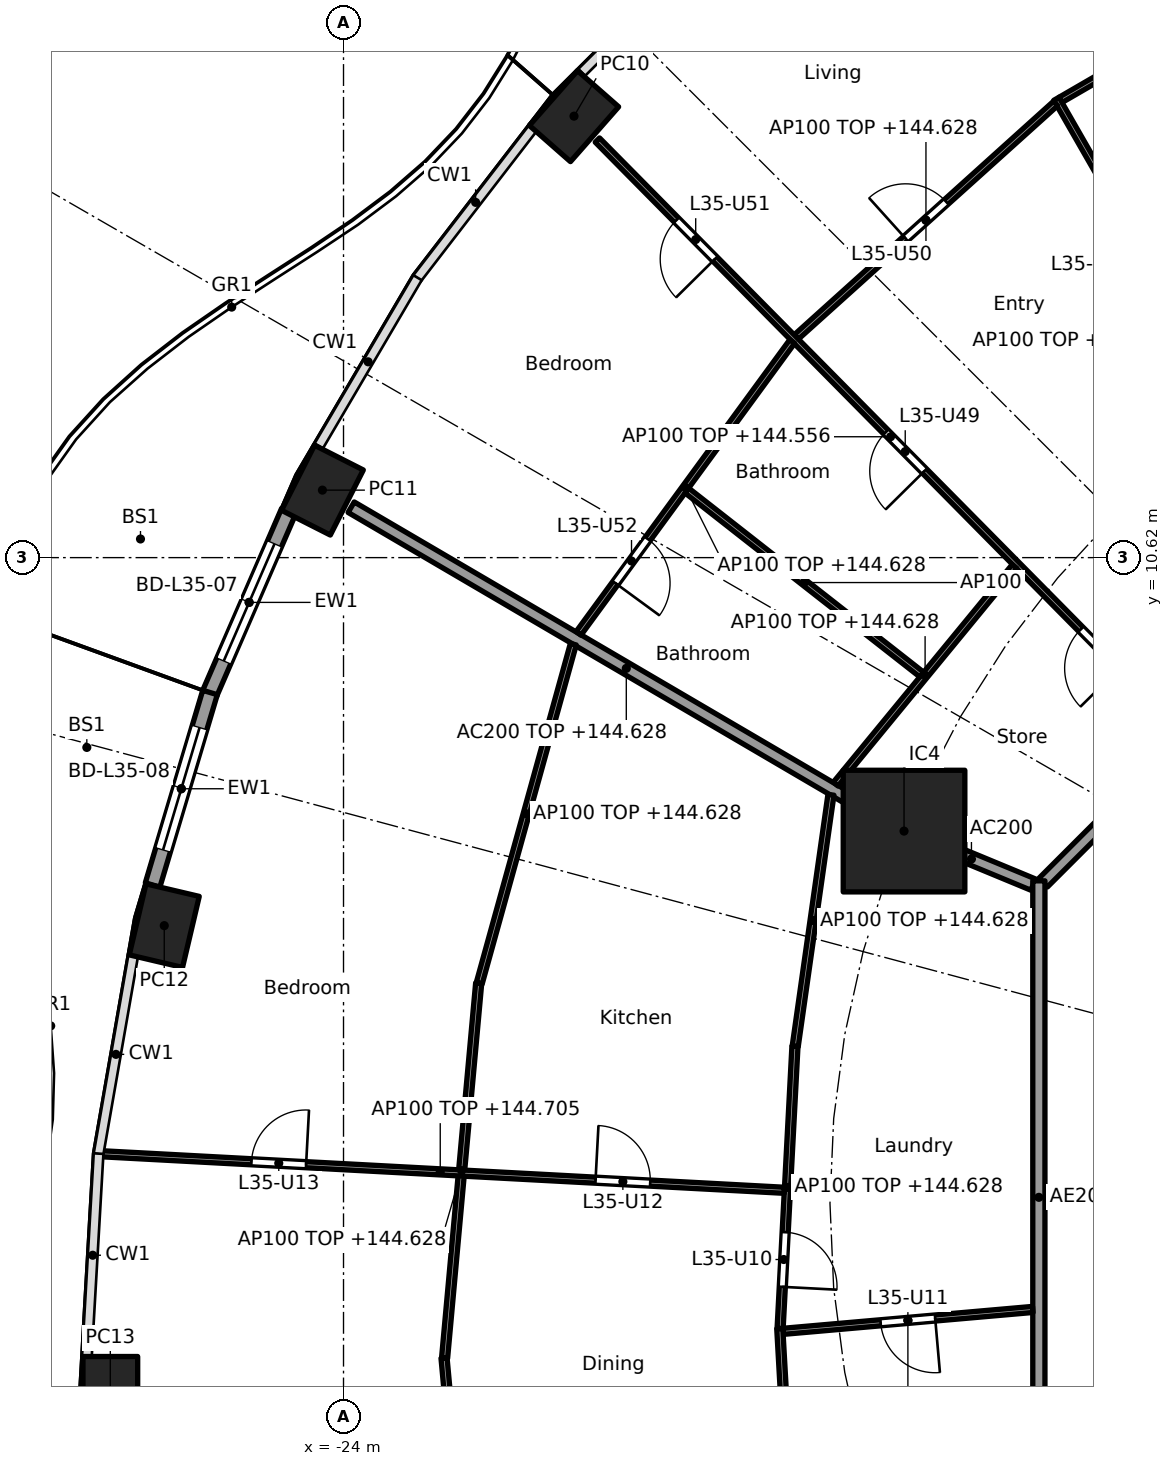
"""IFC4 building model, lengths in metres.
Left out: names, types, materials, properties, quantities, classifications, styles, units other than length and angle.
Written with IfcOpenShell. Run it as: python <this file> out.ifc"""

import sys

from ifc_helpers import new_model, si_unit, direction, frame, frame_2d, origin, origin_2d, place, context, subcontext, project, spatial, rectangle, hollow_rectangle, extrude, element, fill, save


model = new_model("IFC4")
c1 = context("Model", 3, precision=1e-05, world=origin(), true_north=direction((0.0, 1.0)))
c2 = subcontext(c1, "Body", "Model", "MODEL_VIEW")
j1 = project(units=[si_unit("LENGTHUNIT", "METRE"), si_unit("PLANEANGLEUNIT", "RADIAN")], contexts=[c1])
p1 = place(None, origin())
s1 = spatial("IfcSite", under=j1, at=p1, CompositionType="ELEMENT")
p2 = place(p1, origin())
s2 = spatial("IfcBuilding", under=s1, at=p2, CompositionType="ELEMENT")
p3 = place(p2, frame((0.0, 0.0, 141.8)))
s3 = spatial("IfcBuildingStorey", under=s2, at=p3, CompositionType="ELEMENT", Elevation=141.8)
for number, where, z_axis, x_axis in (
    (1, (-20.209, 17.88, 0.0), (0.0, 0.0, 1.0), (-0.66, -0.751, 0.0)),
    (2, (-24.347, 11.73, 0.0), (0.0, 0.0, 1.0), (-0.452, -0.892, 0.0)),
    (3, (-26.948, 4.568, 0.0), (0.0, 0.0, 1.0), (-0.229, -0.973, 0.0)),
    (4, (-27.835, -3.118, 0.0), (0.0, 0.0, 1.0), (0.0, -1.0, 0.0)),
):
    element("IfcColumn", number, at=place(p3, frame(where, z_axis=z_axis, x_axis=x_axis)), inside=s3, PredefinedType="COLUMN", context=c2, shape_type="SweptSolid", body=[
        extrude(hollow_rectangle(XDim=1.2, YDim=0.9, WallThickness=0.04, at=origin_2d()), origin(), (0.0, 0.0, 1.0), 3.7),
    ])
p4 = place(p3, frame((-14.782, 6.123, 0.0), z_axis=(0.0, 0.0, 1.0), x_axis=(1.0, 0.0, 0.0)))
e5 = element("IfcColumn", 5, at=p4, inside=s3, PredefinedType="COLUMN", context=c2, shape_type="SweptSolid", body=[
    extrude(rectangle(XDim=2.0, YDim=2.0, at=origin_2d()), origin(), (0.0, 0.0, 1.0), 3.7),
])
p5 = place(p3, frame((-26.2, 8.388, 0.0), z_axis=(0.0, 0.0, 1.0), x_axis=(0.397638954585, 0.917541967321, 0.0)))
e6 = element("IfcWall", 6, at=p5, inside=s3, PredefinedType="SOLIDWALL", context=c2, shape_type="SweptSolid", body=[
    extrude(rectangle(XDim=3.261, YDim=0.25, at=frame_2d((1.63, 0.0))), origin(), (0.0, 0.0, 1.0), 3.44),
])
p6 = place(p5, frame((0.58, 0.0, 0.0)))
e7 = element("IfcOpeningElement", 7, at=p6, cuts=e6, PredefinedType="OPENING", context=c2, shape_type="SweptSolid", body=[
    extrude(rectangle(XDim=2.1, YDim=2.4, at=frame_2d((1.05, 1.2))), frame((0.0, 0.135, 0.0), z_axis=(0.0, -1.0, 0.0), x_axis=(1.0, 0.0, 0.0)), (0.0, 0.0, 1.0), 0.27),
])
p7 = place(p3, frame((-27.14, 5.237, 0.0), z_axis=(0.0, 0.0, 1.0), x_axis=(0.285909915381, 0.958256500258, 0.0)))
e8 = element("IfcWall", 8, at=p7, inside=s3, PredefinedType="SOLIDWALL", context=c2, shape_type="SweptSolid", body=[
    extrude(rectangle(XDim=3.303, YDim=0.25, at=frame_2d((1.651, 0.0))), origin(), (0.0, 0.0, 1.0), 3.44),
])
p8 = place(p7, frame((0.602, 0.0, 0.0)))
e9 = element("IfcOpeningElement", 9, at=p8, cuts=e8, PredefinedType="OPENING", context=c2, shape_type="SweptSolid", body=[
    extrude(rectangle(XDim=2.1, YDim=2.4, at=frame_2d((1.05, 1.2))), frame((0.0, 0.135, 0.0), z_axis=(0.0, -1.0, 0.0), x_axis=(1.0, 0.0, 0.0)), (0.0, 0.0, 1.0), 0.27),
])
p9 = place(p3, frame((-12.657, 5.243, 0.0), z_axis=(0.0, 0.0, 1.0), x_axis=(-0.923869415315, 0.382707856524, 0.0)))
e10 = element("IfcWall", 10, at=p9, inside=s3, PredefinedType="PARTITIONING", context=c2, shape_type="SweptSolid", body=[
    extrude(rectangle(XDim=2.2, YDim=0.2, at=frame_2d((1.1, 0.0))), origin(), (0.0, 0.0, 1.0), 3.44),
])
p10 = place(p3, frame((-14.825, 6.148, 0.0), z_axis=(0.0, 0.0, 1.0), x_axis=(-0.862852031662, 0.505456597006, 0.0)))
e11 = element("IfcWall", 11, at=p10, inside=s3, PredefinedType="PARTITIONING", context=c2, shape_type="SweptSolid", body=[
    extrude(rectangle(XDim=10.487, YDim=0.2, at=frame_2d((5.244, 0.0))), origin(), (0.0, 0.0, 1.0), 2.828),
])
p11 = place(p3, frame((-5.275, 12.494, 0.0), z_axis=(0.0, 0.0, 1.0), x_axis=(-0.707106781187, -0.707106781187, 0.0)))
e12 = element("IfcWall", 12, at=p11, inside=s3, PredefinedType="PARTITIONING", context=c2, shape_type="SweptSolid", body=[
    extrude(rectangle(XDim=10.209, YDim=0.2, at=frame_2d((5.104, 0.0))), origin(), (0.0, 0.0, 1.0), 3.44),
])
p12 = place(p11, frame((4.604, 0.0, 0.0)))
e13 = element("IfcOpeningElement", 13, at=p12, cuts=e12, PredefinedType="OPENING", context=c2, shape_type="SweptSolid", body=[
    extrude(rectangle(XDim=1.0, YDim=2.1, at=frame_2d((0.5, 1.05))), frame((0.0, 0.11, 0.0), z_axis=(0.0, -1.0, 0.0), x_axis=(1.0, 0.0, 0.0)), (0.0, 0.0, 1.0), 0.22),
])
p13 = place(p3, frame((-12.565, 5.304, 0.0), z_axis=(0.0, 0.0, 1.0), x_axis=(0.0, -1.0, 0.0)))
e14 = element("IfcWall", 14, at=p13, inside=s3, PredefinedType="PARTITIONING", context=c2, shape_type="SweptSolid", body=[
    extrude(rectangle(XDim=10.409, YDim=0.2, at=frame_2d((5.205, 0.0))), origin(), (0.0, 0.0, 1.0), 3.44),
])
p14 = place(p3, frame((-7.586, 20.827, 0.0), z_axis=(0.0, 0.0, 1.0), x_axis=(-0.865093450578, -0.501610727325, 0.0)))
e15 = element("IfcWall", 15, at=p14, inside=s3, PredefinedType="PARTITIONING", context=c2, shape_type="SweptSolid", body=[
    extrude(rectangle(XDim=5.343, YDim=0.1, at=frame_2d((2.671, 0.0))), origin(), (0.0, 0.0, 1.0), 2.828),
])
p15 = place(p3, frame((-7.708, 10.198, 0.0), z_axis=(0.0, 0.0, 1.0), x_axis=(-0.497449462689, 0.867492957937, 0.0)))
e16 = element("IfcWall", 16, at=p15, inside=s3, PredefinedType="PARTITIONING", context=c2, shape_type="SweptSolid", body=[
    extrude(rectangle(XDim=9.185, YDim=0.1, at=frame_2d((4.592, 0.0))), origin(), (0.0, 0.0, 1.0), 2.756),
])
p16 = place(p15, frame((1.511, 0.0, 0.0)))
e17 = element("IfcOpeningElement", 17, at=p16, cuts=e16, PredefinedType="OPENING", context=c2, shape_type="SweptSolid", body=[
    extrude(rectangle(XDim=0.9, YDim=2.1, at=frame_2d((0.45, 1.05))), frame((0.0, 0.06, 0.0), z_axis=(0.0, -1.0, 0.0), x_axis=(1.0, 0.0, 0.0)), (0.0, 0.0, 1.0), 0.12),
])
p17 = place(p15, frame((6.078, 0.0, 0.0)))
e18 = element("IfcOpeningElement", 18, at=p17, cuts=e16, PredefinedType="OPENING", context=c2, shape_type="SweptSolid", body=[
    extrude(rectangle(XDim=0.9, YDim=2.1, at=frame_2d((0.45, 1.05))), frame((0.0, 0.06, 0.0), z_axis=(0.0, -1.0, 0.0), x_axis=(1.0, 0.0, 0.0)), (0.0, 0.0, 1.0), 0.12),
])
p18 = place(p3, frame((-12.289, 18.089, 0.0), z_axis=(0.0, 0.0, 1.0), x_axis=(-0.743146066164, -0.669129228435, 0.0)))
e19 = element("IfcWall", 19, at=p18, inside=s3, PredefinedType="PARTITIONING", context=c2, shape_type="SweptSolid", body=[
    extrude(rectangle(XDim=5.739, YDim=0.1, at=frame_2d((2.87, 0.0))), origin(), (0.0, 0.0, 1.0), 2.828),
])
p19 = place(p18, frame((2.42, 0.0, 0.0)))
e20 = element("IfcOpeningElement", 20, at=p19, cuts=e19, PredefinedType="OPENING", context=c2, shape_type="SweptSolid", body=[
    extrude(rectangle(XDim=0.9, YDim=2.1, at=frame_2d((0.45, 1.05))), frame((0.0, 0.06, 0.0), z_axis=(0.0, -1.0, 0.0), x_axis=(1.0, 0.0, 0.0)), (0.0, 0.0, 1.0), 0.12),
])
p20 = place(p3, frame((-10.182, 7.729, 0.0), z_axis=(0.0, 0.0, 1.0), x_axis=(-0.702930219229, 0.7112588185, 0.0)))
e21 = element("IfcWall", 21, at=p20, inside=s3, PredefinedType="PARTITIONING", context=c2, shape_type="SweptSolid", body=[
    extrude(rectangle(XDim=13.719, YDim=0.1, at=frame_2d((6.859, 0.0))), origin(), (0.0, 0.0, 1.0), 2.756),
])
p21 = place(p20, frame((1.507, 0.0, 0.0)))
e22 = element("IfcOpeningElement", 22, at=p21, cuts=e21, PredefinedType="OPENING", context=c2, shape_type="SweptSolid", body=[
    extrude(rectangle(XDim=0.9, YDim=2.1, at=frame_2d((0.45, 1.05))), frame((0.0, 0.06, 0.0), z_axis=(0.0, -1.0, 0.0), x_axis=(1.0, 0.0, 0.0)), (0.0, 0.0, 1.0), 0.12),
])
p22 = place(p20, frame((6.067, 0.0, 0.0)))
e23 = element("IfcOpeningElement", 23, at=p22, cuts=e21, PredefinedType="OPENING", context=c2, shape_type="SweptSolid", body=[
    extrude(rectangle(XDim=0.9, YDim=2.1, at=frame_2d((0.45, 1.05))), frame((0.0, 0.06, 0.0), z_axis=(0.0, -1.0, 0.0), x_axis=(1.0, 0.0, 0.0)), (0.0, 0.0, 1.0), 0.12),
])
p23 = place(p20, frame((10.969, 0.0, 0.0)))
e24 = element("IfcOpeningElement", 24, at=p23, cuts=e21, PredefinedType="OPENING", context=c2, shape_type="SweptSolid", body=[
    extrude(rectangle(XDim=0.9, YDim=2.1, at=frame_2d((0.45, 1.05))), frame((0.0, 0.06, 0.0), z_axis=(0.0, -1.0, 0.0), x_axis=(1.0, 0.0, 0.0)), (0.0, 0.0, 1.0), 0.12),
])
p24 = place(p3, frame((-12.965, 10.475, 0.0), z_axis=(0.0, 0.0, 1.0), x_axis=(-0.634943961338, -0.772558195841, 0.0)))
e25 = element("IfcWall", 25, at=p24, inside=s3, PredefinedType="PARTITIONING", context=c2, shape_type="SweptSolid", body=[
    extrude(rectangle(XDim=4.632, YDim=0.1, at=frame_2d((2.316, 0.0))), origin(), (0.0, 0.0, 1.0), 2.828),
])
p25 = place(p3, frame((-16.621, 14.174, 0.0), z_axis=(0.0, 0.0, 1.0), x_axis=(-0.590674917338, -0.806909624449, 0.0)))
e26 = element("IfcWall", 26, at=p25, inside=s3, PredefinedType="PARTITIONING", context=c2, shape_type="SweptSolid", body=[
    extrude(rectangle(XDim=5.949, YDim=0.1, at=frame_2d((2.975, 0.0))), origin(), (0.0, 0.0, 1.0), 2.828),
])
p26 = place(p25, frame((4.024, 0.0, 0.0)))
e27 = element("IfcOpeningElement", 27, at=p26, cuts=e26, PredefinedType="OPENING", context=c2, shape_type="SweptSolid", body=[
    extrude(rectangle(XDim=0.9, YDim=2.1, at=frame_2d((0.45, 1.05))), frame((0.0, 0.06, 0.0), z_axis=(0.0, -1.0, 0.0), x_axis=(1.0, 0.0, 0.0)), (0.0, 0.0, 1.0), 0.12),
])
p27 = place(p3, frame((-14.491, 8.697, 0.0), z_axis=(0.0, 0.0, 1.0), x_axis=(-0.787139479951, 0.616775031193, 0.0)))
e28 = element("IfcWall", 28, at=p27, inside=s3, PredefinedType="PARTITIONING", context=c2, shape_type="SweptSolid", body=[
    extrude(rectangle(XDim=4.907, YDim=0.1, at=frame_2d((2.453, 0.0))), origin(), (0.0, 0.0, 1.0), 3.44),
])
p28 = place(p3, frame((-15.984, 6.72, 0.0), z_axis=(0.0, 0.0, 1.0), x_axis=(-0.140684869512, -0.990054426529, 0.0)))
e29 = element("IfcWall", 29, at=p28, inside=s3, PredefinedType="PARTITIONING", context=c2, shape_type="SweptSolid", body=[
    extrude(rectangle(XDim=4.177, YDim=0.1, at=frame_2d((2.088, 0.0))), origin(), (0.0, 0.0, 1.0), 2.828),
])
p29 = place(p3, frame((-20.221, 9.197, 0.0), z_axis=(0.0, 0.0, 1.0), x_axis=(-0.267398009191, -0.963586168789, 0.0)))
e30 = element("IfcWall", 30, at=p29, inside=s3, PredefinedType="PARTITIONING", context=c2, shape_type="SweptSolid", body=[
    extrude(rectangle(XDim=5.788, YDim=0.1, at=frame_2d((2.894, 0.0))), origin(), (0.0, 0.0, 1.0), 2.828),
])
p30 = place(p3, frame((-16.576, 2.585, 0.0), z_axis=(0.0, 0.0, 1.0), x_axis=(-0.052509224895, -0.998620439056, 0.0)))
e31 = element("IfcWall", 31, at=p30, inside=s3, PredefinedType="PARTITIONING", context=c2, shape_type="SweptSolid", body=[
    extrude(rectangle(XDim=4.649, YDim=0.1, at=frame_2d((2.325, 0.0))), origin(), (0.0, 0.0, 1.0), 2.828),
])
p31 = place(p30, frame((3.062, 0.0, 0.0)))
e32 = element("IfcOpeningElement", 32, at=p31, cuts=e31, PredefinedType="OPENING", context=c2, shape_type="SweptSolid", body=[
    extrude(rectangle(XDim=0.9, YDim=2.1, at=frame_2d((0.45, 1.05))), frame((0.0, 0.06, 0.0), z_axis=(0.0, -1.0, 0.0), x_axis=(1.0, 0.0, 0.0)), (0.0, 0.0, 1.0), 0.12),
])
p32 = place(p3, frame((-21.777, 3.621, 0.0), z_axis=(0.0, 0.0, 1.0), x_axis=(-0.090606877484, -0.995886737412, 0.0)))
e33 = element("IfcWall", 33, at=p32, inside=s3, PredefinedType="PARTITIONING", context=c2, shape_type="SweptSolid", body=[
    extrude(rectangle(XDim=6.189, YDim=0.1, at=frame_2d((3.095, 0.0))), origin(), (0.0, 0.0, 1.0), 2.828),
])
p33 = place(p3, frame((-16.75, 0.216, 0.0), z_axis=(0.0, 0.0, 1.0), x_axis=(-0.998572054207, 0.053421461579, 0.0)))
e34 = element("IfcWall", 34, at=p33, inside=s3, PredefinedType="PARTITIONING", context=c2, shape_type="SweptSolid", body=[
    extrude(rectangle(XDim=11.334, YDim=0.1, at=frame_2d((5.667, 0.0))), origin(), (0.0, 0.0, 1.0), 2.905),
])
p34 = place(p33, frame((2.209, 0.0, 0.0)))
e35 = element("IfcOpeningElement", 35, at=p34, cuts=e34, PredefinedType="OPENING", context=c2, shape_type="SweptSolid", body=[
    extrude(rectangle(XDim=0.9, YDim=2.1, at=frame_2d((0.45, 1.05))), frame((0.0, 0.06, 0.0), z_axis=(0.0, -1.0, 0.0), x_axis=(1.0, 0.0, 0.0)), (0.0, 0.0, 1.0), 0.12),
])
p35 = place(p33, frame((7.876, 0.0, 0.0)))
e36 = element("IfcOpeningElement", 36, at=p35, cuts=e34, PredefinedType="OPENING", context=c2, shape_type="SweptSolid", body=[
    extrude(rectangle(XDim=0.9, YDim=2.1, at=frame_2d((0.45, 1.05))), frame((0.0, 0.06, 0.0), z_axis=(0.0, -1.0, 0.0), x_axis=(1.0, 0.0, 0.0)), (0.0, 0.0, 1.0), 0.12),
])
p36 = place(p3, frame((-12.664, -1.744, 0.0), z_axis=(0.0, 0.0, 1.0), x_axis=(-0.996181049379, -0.08731160781, 0.0)))
e37 = element("IfcWall", 37, at=p36, inside=s3, PredefinedType="PARTITIONING", context=c2, shape_type="SweptSolid", body=[
    extrude(rectangle(XDim=4.125, YDim=0.1, at=frame_2d((2.062, 0.0))), origin(), (0.0, 0.0, 1.0), 2.756),
])
p37 = place(p36, frame((1.612, 0.0, 0.0)))
e38 = element("IfcOpeningElement", 38, at=p37, cuts=e37, PredefinedType="OPENING", context=c2, shape_type="SweptSolid", body=[
    extrude(rectangle(XDim=0.9, YDim=2.1, at=frame_2d((0.45, 1.05))), frame((0.0, 0.06, 0.0), z_axis=(0.0, -1.0, 0.0), x_axis=(1.0, 0.0, 0.0)), (0.0, 0.0, 1.0), 0.12),
])
p38 = place(p3, frame((-16.825, -2.058, 0.0), z_axis=(0.0, 0.0, 1.0), x_axis=(0.055971643802, -0.998432358796, 0.0)))
e39 = element("IfcWall", 39, at=p38, inside=s3, PredefinedType="PARTITIONING", context=c2, shape_type="SweptSolid", body=[
    extrude(rectangle(XDim=4.798, YDim=0.1, at=frame_2d((2.399, 0.0))), origin(), (0.0, 0.0, 1.0), 2.828),
])
p39 = place(p3, frame((-22.347, -2.542, 0.0), z_axis=(0.0, 0.0, 1.0), x_axis=(0.091783634244, -0.995778973711, 0.0)))
e40 = element("IfcWall", 40, at=p39, inside=s3, PredefinedType="PARTITIONING", context=c2, shape_type="SweptSolid", body=[
    extrude(rectangle(XDim=6.315, YDim=0.1, at=frame_2d((3.157, 0.0))), origin(), (0.0, 0.0, 1.0), 2.828),
])
p40 = place(p39, frame((2.708, 0.0, 0.0)))
e41 = element("IfcOpeningElement", 41, at=p40, cuts=e40, PredefinedType="OPENING", context=c2, shape_type="SweptSolid", body=[
    extrude(rectangle(XDim=0.9, YDim=2.1, at=frame_2d((0.45, 1.05))), frame((0.0, 0.06, 0.0), z_axis=(0.0, -1.0, 0.0), x_axis=(1.0, 0.0, 0.0)), (0.0, 0.0, 1.0), 0.12),
])
p41 = place(p6, origin())
e42 = element("IfcDoor", 42, at=p41, inside=s3, OperationType="SLIDING_TO_LEFT", PredefinedType="DOOR", context=c2, shape_type="SweptSolid", body=[
    extrude(rectangle(XDim=2.1, YDim=2.4, at=frame_2d((1.05, 1.2))), frame((0.0, 0.025, 0.0), z_axis=(0.0, -1.0, 0.0), x_axis=(1.0, 0.0, 0.0)), (0.0, 0.0, 1.0), 0.05),
])
fill(e7, e42)
p42 = place(p8, origin())
e43 = element("IfcDoor", 43, at=p42, inside=s3, OperationType="SLIDING_TO_LEFT", PredefinedType="DOOR", context=c2, shape_type="SweptSolid", body=[
    extrude(rectangle(XDim=2.1, YDim=2.4, at=frame_2d((1.05, 1.2))), frame((0.0, 0.025, 0.0), z_axis=(0.0, -1.0, 0.0), x_axis=(1.0, 0.0, 0.0)), (0.0, 0.0, 1.0), 0.05),
])
fill(e9, e43)
p43 = place(p31, origin())
e44 = element("IfcDoor", 44, at=p43, inside=s3, OperationType="SINGLE_SWING_RIGHT", PredefinedType="DOOR", context=c2, shape_type="SweptSolid", body=[
    extrude(rectangle(XDim=0.9, YDim=2.1, at=frame_2d((0.45, 1.05))), frame((0.0, 0.025, 0.0), z_axis=(0.0, -1.0, 0.0), x_axis=(1.0, 0.0, 0.0)), (0.0, 0.0, 1.0), 0.05),
])
fill(e32, e44)
p44 = place(p37, origin())
e45 = element("IfcDoor", 45, at=p44, inside=s3, OperationType="SINGLE_SWING_LEFT", PredefinedType="DOOR", context=c2, shape_type="SweptSolid", body=[
    extrude(rectangle(XDim=0.9, YDim=2.1, at=frame_2d((0.45, 1.05))), frame((0.0, 0.025, 0.0), z_axis=(0.0, -1.0, 0.0), x_axis=(1.0, 0.0, 0.0)), (0.0, 0.0, 1.0), 0.05),
])
fill(e38, e45)
p45 = place(p34, frame((0.9, 0.0, 0.0), x_axis=(-1.0, 0.0, 0.0)))
e46 = element("IfcDoor", 46, at=p45, inside=s3, OperationType="SINGLE_SWING_LEFT", PredefinedType="DOOR", context=c2, shape_type="SweptSolid", body=[
    extrude(rectangle(XDim=0.9, YDim=2.1, at=frame_2d((0.45, 1.05))), frame((0.0, 0.025, 0.0), z_axis=(0.0, -1.0, 0.0), x_axis=(1.0, 0.0, 0.0)), (0.0, 0.0, 1.0), 0.05),
])
fill(e35, e46)
p46 = place(p35, frame((0.9, 0.0, 0.0), x_axis=(-1.0, 0.0, 0.0)))
e47 = element("IfcDoor", 47, at=p46, inside=s3, OperationType="SINGLE_SWING_RIGHT", PredefinedType="DOOR", context=c2, shape_type="SweptSolid", body=[
    extrude(rectangle(XDim=0.9, YDim=2.1, at=frame_2d((0.45, 1.05))), frame((0.0, 0.025, 0.0), z_axis=(0.0, -1.0, 0.0), x_axis=(1.0, 0.0, 0.0)), (0.0, 0.0, 1.0), 0.05),
])
fill(e36, e47)
p47 = place(p21, origin())
e48 = element("IfcDoor", 48, at=p47, inside=s3, OperationType="SINGLE_SWING_LEFT", PredefinedType="DOOR", context=c2, shape_type="SweptSolid", body=[
    extrude(rectangle(XDim=0.9, YDim=2.1, at=frame_2d((0.45, 1.05))), frame((0.0, 0.025, 0.0), z_axis=(0.0, -1.0, 0.0), x_axis=(1.0, 0.0, 0.0)), (0.0, 0.0, 1.0), 0.05),
])
fill(e22, e48)
p48 = place(p22, origin())
e49 = element("IfcDoor", 49, at=p48, inside=s3, OperationType="SINGLE_SWING_LEFT", PredefinedType="DOOR", context=c2, shape_type="SweptSolid", body=[
    extrude(rectangle(XDim=0.9, YDim=2.1, at=frame_2d((0.45, 1.05))), frame((0.0, 0.025, 0.0), z_axis=(0.0, -1.0, 0.0), x_axis=(1.0, 0.0, 0.0)), (0.0, 0.0, 1.0), 0.05),
])
fill(e23, e49)
p49 = place(p19, frame((0.9, 0.0, 0.0), x_axis=(-1.0, 0.0, 0.0)))
e50 = element("IfcDoor", 50, at=p49, inside=s3, OperationType="SINGLE_SWING_LEFT", PredefinedType="DOOR", context=c2, shape_type="SweptSolid", body=[
    extrude(rectangle(XDim=0.9, YDim=2.1, at=frame_2d((0.45, 1.05))), frame((0.0, 0.025, 0.0), z_axis=(0.0, -1.0, 0.0), x_axis=(1.0, 0.0, 0.0)), (0.0, 0.0, 1.0), 0.05),
])
fill(e20, e50)
p50 = place(p23, origin())
e51 = element("IfcDoor", 51, at=p50, inside=s3, OperationType="SINGLE_SWING_LEFT", PredefinedType="DOOR", context=c2, shape_type="SweptSolid", body=[
    extrude(rectangle(XDim=0.9, YDim=2.1, at=frame_2d((0.45, 1.05))), frame((0.0, 0.025, 0.0), z_axis=(0.0, -1.0, 0.0), x_axis=(1.0, 0.0, 0.0)), (0.0, 0.0, 1.0), 0.05),
])
fill(e24, e51)
p51 = place(p26, origin())
e52 = element("IfcDoor", 52, at=p51, inside=s3, OperationType="SINGLE_SWING_RIGHT", PredefinedType="DOOR", context=c2, shape_type="SweptSolid", body=[
    extrude(rectangle(XDim=0.9, YDim=2.1, at=frame_2d((0.45, 1.05))), frame((0.0, 0.025, 0.0), z_axis=(0.0, -1.0, 0.0), x_axis=(1.0, 0.0, 0.0)), (0.0, 0.0, 1.0), 0.05),
])
fill(e27, e52)
save(model, sys.argv[1])
